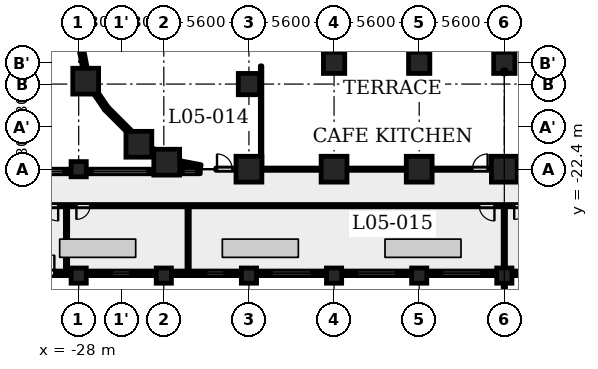
"""IFC4 building model, lengths in metres.
Left out: names, types, materials, properties, quantities, classifications, styles, units other than length and angle.
Written with IfcOpenShell. Run it as: python <this file> out.ifc"""

import sys

from ifc_helpers import new_model, si_unit, direction, frame, frame_2d, origin, origin_2d, place, context, subcontext, project, spatial, polyline, rectangle, circle, outline, extrude, element, fill, save


model = new_model("IFC4")
c1 = context("Model", 3, precision=1e-05, world=origin(), true_north=direction((0.0, 1.0)))
c2 = subcontext(c1, "Body", "Model", "MODEL_VIEW")
j1 = project(units=[si_unit("LENGTHUNIT", "METRE"), si_unit("PLANEANGLEUNIT", "RADIAN")], contexts=[c1])
p1 = place(None, origin())
s1 = spatial("IfcSite", under=j1, at=p1, CompositionType="ELEMENT")
p2 = place(p1, origin())
s2 = spatial("IfcBuilding", under=s1, at=p2, CompositionType="ELEMENT")
p3 = place(p2, frame((0.0, 0.0, 25.7)))
s3 = spatial("IfcBuildingStorey", under=s2, at=p3, CompositionType="ELEMENT", Elevation=25.7)
for number, where, z_axis, x_axis in (
    (1, (-22.209, -21.938, 0.0), (0.0, 0.0, 1.0), (1.0, 0.0, 0.0)),
    (2, (-16.8, -22.4, 0.0), (0.0, 0.0, 1.0), (1.0, 0.0, 0.0)),
    (3, (-11.2, -22.4, 0.0), (0.0, 0.0, 1.0), (1.0, 0.0, 0.0)),
    (4, (-5.6, -22.4, 0.0), (0.0, 0.0, 1.0), (1.0, 0.0, 0.0)),
    (5, (0.0, -22.4, 0.0), (0.0, 0.0, 1.0), (1.0, 0.0, 0.0)),
    (6, (-27.538, -16.609, 0.0), (0.0, 0.0, 1.0), (1.0, 0.0, 0.0)),
    (7, (-24.04, -20.76, 0.0), (0.0, 0.0, 1.0), (1.0, 0.0, 0.0)),
):
    element("IfcColumn", number, at=place(p3, frame(where, z_axis=z_axis, x_axis=x_axis)), inside=s3, PredefinedType="COLUMN", context=c2, shape_type="SweptSolid", body=[
        extrude(rectangle(XDim=1.7, YDim=1.7, at=origin_2d()), origin(), (0.0, 0.0, 1.0), 4.8),
    ])
for number, where, z_axis, x_axis in (
    (8, (-16.8, -16.8, 0.0), (0.0, 0.0, 1.0), (1.0, 0.0, 0.0)),
    (9, (-11.2, -15.4, 0.0), (0.0, 0.0, 1.0), (1.0, 0.0, 0.0)),
    (10, (-5.6, -15.4, 0.0), (0.0, 0.0, 1.0), (1.0, 0.0, 0.0)),
    (11, (0.0, -15.4, 0.0), (0.0, 0.0, 1.0), (1.0, 0.0, 0.0)),
):
    element("IfcColumn", number, at=place(p3, frame(where, z_axis=z_axis, x_axis=x_axis)), inside=s3, PredefinedType="COLUMN", context=c2, shape_type="SweptSolid", body=[
        extrude(rectangle(XDim=1.4, YDim=1.4, at=origin_2d()), origin(), (0.0, 0.0, 1.0), 4.8),
    ])
for number, where, z_axis, x_axis in (
    (12, (-28.0, -29.4, 0.0), (0.0, 0.0, 1.0), (1.0, 0.0, 0.0)),
    (13, (-22.4, -29.4, 0.0), (0.0, 0.0, 1.0), (1.0, 0.0, 0.0)),
    (14, (-16.8, -29.4, 0.0), (0.0, 0.0, 1.0), (1.0, 0.0, 0.0)),
    (15, (-11.2, -29.4, 0.0), (0.0, 0.0, 1.0), (1.0, 0.0, 0.0)),
    (16, (-5.6, -29.4, 0.0), (0.0, 0.0, 1.0), (1.0, 0.0, 0.0)),
    (17, (0.0, -29.4, 0.0), (0.0, 0.0, 1.0), (1.0, 0.0, 0.0)),
    (18, (-28.0, -22.4, 0.0), (0.0, 0.0, 1.0), (1.0, 0.0, 0.0)),
):
    element("IfcColumn", number, at=place(p3, frame(where, z_axis=z_axis, x_axis=x_axis)), inside=s3, PredefinedType="COLUMN", context=c2, shape_type="SweptSolid", body=[
        extrude(circle(Radius=0.5, at=origin_2d()), origin(), (0.0, 0.0, 1.0), 4.8),
    ])
for number, where, z_axis, x_axis in (
    (19, (-27.853, -14.372, 0.0), (0.0, 0.0, 1.0), (0.187, -0.982, 0.0)),
    (20, (-26.969, -17.25, 0.0), (0.0, 0.0, 1.0), (0.562, -0.827, 0.0)),
):
    element("IfcWall", number, at=place(p3, frame(where, z_axis=z_axis, x_axis=x_axis)), inside=s3, PredefinedType="SOLIDWALL", context=c2, shape_type="SweptSolid", body=[
        extrude(rectangle(XDim=1.406, YDim=0.3, at=frame_2d((0.703, 0.0))), origin(), (0.0, 0.0, 1.0), 3.55),
    ])
p4 = place(p3, frame((-26.197, -18.391, 0.0), z_axis=(0.0, 0.0, 1.0), x_axis=(0.707054835785, -0.707158722772, 0.0)))
e21 = element("IfcWall", 21, at=p4, inside=s3, PredefinedType="SOLIDWALL", context=c2, shape_type="SweptSolid", body=[
    extrude(rectangle(XDim=2.35, YDim=0.3, at=frame_2d((1.175, 0.0))), origin(), (0.0, 0.0, 1.0), 3.55),
])
p5 = place(p3, frame((-23.244, -21.101, 0.0), z_axis=(0.0, 0.0, 1.0), x_axis=(0.827135885329, -0.562001981492, 0.0)))
e22 = element("IfcWall", 22, at=p5, inside=s3, PredefinedType="SOLIDWALL", context=c2, shape_type="SweptSolid", body=[
    extrude(rectangle(XDim=0.477, YDim=0.3, at=frame_2d((0.239, 0.0))), origin(), (0.0, 0.0, 1.0), 4.45),
])
p6 = place(p3, frame((-21.353, -21.989, 0.0), z_axis=(0.0, 0.0, 1.0), x_axis=(0.98229142023, -0.187359455971, 0.0)))
e23 = element("IfcWall", 23, at=p6, inside=s3, PredefinedType="SOLIDWALL", context=c2, shape_type="SweptSolid", body=[
    extrude(rectangle(XDim=1.406, YDim=0.3, at=frame_2d((0.703, 0.0))), origin(), (0.0, 0.0, 1.0), 3.55),
])
p7 = place(p3, frame((-20.0, -22.55, 0.0), z_axis=(0.0, 0.0, 1.0), x_axis=(-1.0, 0.0, 0.0)))
e24 = element("IfcWall", 24, at=p7, inside=s3, PredefinedType="SOLIDWALL", context=c2, shape_type="SweptSolid", body=[
    extrude(rectangle(XDim=1.359, YDim=0.3, at=frame_2d((0.679, 0.0))), origin(), (0.0, 0.0, 1.0), 3.55),
])
p8 = place(p7, frame((0.279, 0.0, 0.6)))
e25 = element("IfcOpeningElement", 25, at=p8, cuts=e24, PredefinedType="OPENING", context=c2, shape_type="SweptSolid", body=[
    extrude(rectangle(XDim=0.8, YDim=1.55, at=frame_2d((0.4, 0.775))), frame((0.0, 0.16, 0.0), z_axis=(0.0, -1.0, 0.0), x_axis=(1.0, 0.0, 0.0)), (0.0, 0.0, 1.0), 0.32),
])
p9 = place(p3, frame((-23.059, -22.55, 0.0), z_axis=(0.0, 0.0, 1.0), x_axis=(-1.0, 0.0, 0.0)))
e26 = element("IfcWall", 26, at=p9, inside=s3, PredefinedType="SOLIDWALL", context=c2, shape_type="SweptSolid", body=[
    extrude(rectangle(XDim=4.441, YDim=0.3, at=frame_2d((2.221, 0.0))), origin(), (0.0, 0.0, 1.0), 4.45),
])
p10 = place(p9, frame((0.421, 0.0, 1.2)))
e27 = element("IfcOpeningElement", 27, at=p10, cuts=e26, PredefinedType="OPENING", context=c2, shape_type="SweptSolid", body=[
    extrude(rectangle(XDim=3.6, YDim=0.95, at=frame_2d((1.8, 0.475))), frame((0.0, 0.16, 0.0), z_axis=(0.0, -1.0, 0.0), x_axis=(1.0, 0.0, 0.0)), (0.0, 0.0, 1.0), 0.32),
])
p11 = place(p3, frame((-28.5, -22.55, 0.0), z_axis=(0.0, 0.0, 1.0), x_axis=(-1.0, 0.0, 0.0)))
e28 = element("IfcWall", 28, at=p11, inside=s3, PredefinedType="SOLIDWALL", context=c2, shape_type="SweptSolid", body=[
    extrude(rectangle(XDim=4.6, YDim=0.3, at=frame_2d((2.3, 0.0))), origin(), (0.0, 0.0, 1.0), 4.45),
])
p12 = place(p11, frame((0.5, 0.0, 1.2)))
e29 = element("IfcOpeningElement", 29, at=p12, cuts=e28, PredefinedType="OPENING", context=c2, shape_type="SweptSolid", body=[
    extrude(rectangle(XDim=3.6, YDim=0.95, at=frame_2d((1.8, 0.475))), frame((0.0, 0.16, 0.0), z_axis=(0.0, -1.0, 0.0), x_axis=(1.0, 0.0, 0.0)), (0.0, 0.0, 1.0), 0.32),
])
p13 = place(p3, frame((-33.1, -29.25, 0.0), z_axis=(0.0, 0.0, 1.0), x_axis=(1.0, 0.0, 0.0)))
e30 = element("IfcWall", 30, at=p13, inside=s3, PredefinedType="SOLIDWALL", context=c2, shape_type="SweptSolid", body=[
    extrude(rectangle(XDim=4.6, YDim=0.3, at=frame_2d((2.3, 0.0))), origin(), (0.0, 0.0, 1.0), 3.65),
])
p14 = place(p13, frame((1.1, 0.0, 0.0)))
e31 = element("IfcOpeningElement", 31, at=p14, cuts=e30, PredefinedType="OPENING", context=c2, shape_type="SweptSolid", body=[
    extrude(rectangle(XDim=2.4, YDim=2.3, at=frame_2d((1.2, 1.15))), frame((0.0, 0.16, 0.0), z_axis=(0.0, -1.0, 0.0), x_axis=(1.0, 0.0, 0.0)), (0.0, 0.0, 1.0), 0.32),
])
p15 = place(p3, frame((-27.5, -29.25, 0.0), z_axis=(0.0, 0.0, 1.0), x_axis=(1.0, 0.0, 0.0)))
e32 = element("IfcWall", 32, at=p15, inside=s3, PredefinedType="SOLIDWALL", context=c2, shape_type="SweptSolid", body=[
    extrude(rectangle(XDim=4.6, YDim=0.3, at=frame_2d((2.3, 0.0))), origin(), (0.0, 0.0, 1.0), 3.65),
])
p16 = place(p15, frame((1.7, 0.0, 0.6)))
e33 = element("IfcOpeningElement", 33, at=p16, cuts=e32, PredefinedType="OPENING", context=c2, shape_type="SweptSolid", body=[
    extrude(rectangle(XDim=1.2, YDim=1.55, at=frame_2d((0.6, 0.775))), frame((0.0, 0.16, 0.0), z_axis=(0.0, -1.0, 0.0), x_axis=(1.0, 0.0, 0.0)), (0.0, 0.0, 1.0), 0.32),
])
p17 = place(p3, frame((-21.9, -29.25, 0.0), z_axis=(0.0, 0.0, 1.0), x_axis=(1.0, 0.0, 0.0)))
e34 = element("IfcWall", 34, at=p17, inside=s3, PredefinedType="SOLIDWALL", context=c2, shape_type="SweptSolid", body=[
    extrude(rectangle(XDim=4.6, YDim=0.3, at=frame_2d((2.3, 0.0))), origin(), (0.0, 0.0, 1.0), 3.65),
])
p18 = place(p17, frame((2.288, 0.0, 0.6)))
e35 = element("IfcOpeningElement", 35, at=p18, cuts=e34, PredefinedType="OPENING", context=c2, shape_type="SweptSolid", body=[
    extrude(rectangle(XDim=1.2, YDim=1.55, at=frame_2d((0.6, 0.775))), frame((0.0, 0.16, 0.0), z_axis=(0.0, -1.0, 0.0), x_axis=(1.0, 0.0, 0.0)), (0.0, 0.0, 1.0), 0.32),
])
p19 = place(p3, frame((-16.3, -29.25, 0.0), z_axis=(0.0, 0.0, 1.0), x_axis=(1.0, 0.0, 0.0)))
e36 = element("IfcWall", 36, at=p19, inside=s3, PredefinedType="SOLIDWALL", context=c2, shape_type="SweptSolid", body=[
    extrude(rectangle(XDim=4.6, YDim=0.3, at=frame_2d((2.3, 0.0))), origin(), (0.0, 0.0, 1.0), 3.65),
])
p20 = place(p19, frame((1.0, 0.0, 0.9)))
e37 = element("IfcOpeningElement", 37, at=p20, cuts=e36, PredefinedType="OPENING", context=c2, shape_type="SweptSolid", body=[
    extrude(rectangle(XDim=2.6, YDim=1.25, at=frame_2d((1.3, 0.625))), frame((0.0, 0.16, 0.0), z_axis=(0.0, -1.0, 0.0), x_axis=(1.0, 0.0, 0.0)), (0.0, 0.0, 1.0), 0.32),
])
p21 = place(p3, frame((-10.7, -29.25, 0.0), z_axis=(0.0, 0.0, 1.0), x_axis=(1.0, 0.0, 0.0)))
e38 = element("IfcWall", 38, at=p21, inside=s3, PredefinedType="SOLIDWALL", context=c2, shape_type="SweptSolid", body=[
    extrude(rectangle(XDim=4.6, YDim=0.3, at=frame_2d((2.3, 0.0))), origin(), (0.0, 0.0, 1.0), 3.65),
])
p22 = place(p21, frame((1.0, 0.0, 0.9)))
e39 = element("IfcOpeningElement", 39, at=p22, cuts=e38, PredefinedType="OPENING", context=c2, shape_type="SweptSolid", body=[
    extrude(rectangle(XDim=2.6, YDim=1.25, at=frame_2d((1.3, 0.625))), frame((0.0, 0.16, 0.0), z_axis=(0.0, -1.0, 0.0), x_axis=(1.0, 0.0, 0.0)), (0.0, 0.0, 1.0), 0.32),
])
p23 = place(p3, frame((-5.1, -29.25, 0.0), z_axis=(0.0, 0.0, 1.0), x_axis=(1.0, 0.0, 0.0)))
e40 = element("IfcWall", 40, at=p23, inside=s3, PredefinedType="SOLIDWALL", context=c2, shape_type="SweptSolid", body=[
    extrude(rectangle(XDim=4.6, YDim=0.3, at=frame_2d((2.3, 0.0))), origin(), (0.0, 0.0, 1.0), 3.65),
])
p24 = place(p23, frame((1.0, 0.0, 0.9)))
e41 = element("IfcOpeningElement", 41, at=p24, cuts=e40, PredefinedType="OPENING", context=c2, shape_type="SweptSolid", body=[
    extrude(rectangle(XDim=2.6, YDim=1.25, at=frame_2d((1.3, 0.625))), frame((0.0, 0.16, 0.0), z_axis=(0.0, -1.0, 0.0), x_axis=(1.0, 0.0, 0.0)), (0.0, 0.0, 1.0), 0.32),
])
p25 = place(p3, frame((0.5, -29.25, 0.0), z_axis=(0.0, 0.0, 1.0), x_axis=(1.0, 0.0, 0.0)))
e42 = element("IfcWall", 42, at=p25, inside=s3, PredefinedType="SOLIDWALL", context=c2, shape_type="SweptSolid", body=[
    extrude(rectangle(XDim=4.6, YDim=0.3, at=frame_2d((2.3, 0.0))), origin(), (0.0, 0.0, 1.0), 3.65),
])
p26 = place(p25, frame((1.0, 0.0, 0.9)))
e43 = element("IfcOpeningElement", 43, at=p26, cuts=e42, PredefinedType="OPENING", context=c2, shape_type="SweptSolid", body=[
    extrude(rectangle(XDim=2.6, YDim=1.25, at=frame_2d((1.3, 0.625))), frame((0.0, 0.16, 0.0), z_axis=(0.0, -1.0, 0.0), x_axis=(1.0, 0.0, 0.0)), (0.0, 0.0, 1.0), 0.32),
])
p27 = place(p3, frame((-37.0, -24.8, 0.0), z_axis=(0.0, 0.0, 1.0), x_axis=(1.0, 0.0, 0.0)))
e44 = element("IfcWall", 44, at=p27, inside=s3, PredefinedType="PARTITIONING", context=c2, shape_type="SweptSolid", body=[
    extrude(rectangle(XDim=74.0, YDim=0.15, at=frame_2d((37.0, 0.0))), origin(), (0.0, 0.0, 1.0), 4.45),
])
p28 = place(p27, frame((6.65, 0.0, 0.0)))
e45 = element("IfcOpeningElement", 45, at=p28, cuts=e44, PredefinedType="OPENING", context=c2, shape_type="SweptSolid", body=[
    extrude(rectangle(XDim=1.0, YDim=2.1, at=frame_2d((0.5, 1.05))), frame((0.0, 0.085, 0.0), z_axis=(0.0, -1.0, 0.0), x_axis=(1.0, 0.0, 0.0)), (0.0, 0.0, 1.0), 0.17),
])
p29 = place(p27, frame((8.85, 0.0, 0.0)))
e46 = element("IfcOpeningElement", 46, at=p29, cuts=e44, PredefinedType="OPENING", context=c2, shape_type="SweptSolid", body=[
    extrude(rectangle(XDim=0.9, YDim=2.1, at=frame_2d((0.45, 1.05))), frame((0.0, 0.085, 0.0), z_axis=(0.0, -1.0, 0.0), x_axis=(1.0, 0.0, 0.0)), (0.0, 0.0, 1.0), 0.17),
])
p30 = place(p27, frame((35.35, 0.0, 0.0)))
e47 = element("IfcOpeningElement", 47, at=p30, cuts=e44, PredefinedType="OPENING", context=c2, shape_type="SweptSolid", body=[
    extrude(rectangle(XDim=1.0, YDim=2.1, at=frame_2d((0.5, 1.05))), frame((0.0, 0.085, 0.0), z_axis=(0.0, -1.0, 0.0), x_axis=(1.0, 0.0, 0.0)), (0.0, 0.0, 1.0), 0.17),
])
p31 = place(p27, frame((37.65, 0.0, 0.0)))
e48 = element("IfcOpeningElement", 48, at=p31, cuts=e44, PredefinedType="OPENING", context=c2, shape_type="SweptSolid", body=[
    extrude(rectangle(XDim=0.9, YDim=2.1, at=frame_2d((0.45, 1.05))), frame((0.0, 0.085, 0.0), z_axis=(0.0, -1.0, 0.0), x_axis=(1.0, 0.0, 0.0)), (0.0, 0.0, 1.0), 0.17),
])
p32 = place(p27, frame((53.4, 0.0, 0.0)))
e49 = element("IfcOpeningElement", 49, at=p32, cuts=e44, PredefinedType="OPENING", context=c2, shape_type="SweptSolid", body=[
    extrude(rectangle(XDim=1.0, YDim=2.1, at=frame_2d((0.5, 1.05))), frame((0.0, 0.085, 0.0), z_axis=(0.0, -1.0, 0.0), x_axis=(1.0, 0.0, 0.0)), (0.0, 0.0, 1.0), 0.17),
])
p33 = place(p27, frame((55.65, 0.0, 0.0)))
e50 = element("IfcOpeningElement", 50, at=p33, cuts=e44, PredefinedType="OPENING", context=c2, shape_type="SweptSolid", body=[
    extrude(rectangle(XDim=1.0, YDim=2.1, at=frame_2d((0.5, 1.05))), frame((0.0, 0.085, 0.0), z_axis=(0.0, -1.0, 0.0), x_axis=(1.0, 0.0, 0.0)), (0.0, 0.0, 1.0), 0.17),
])
p34 = place(p3, frame((-18.98, -22.4, 0.0), z_axis=(0.0, 0.0, 1.0), x_axis=(1.0, 0.0, 0.0)))
e51 = element("IfcWall", 51, at=p34, inside=s3, PredefinedType="PARTITIONING", context=c2, shape_type="SweptSolid", body=[
    extrude(rectangle(XDim=38.211, YDim=0.15, at=frame_2d((19.105, 0.0))), origin(), (0.0, 0.0, 1.0), 3.55),
])
p35 = place(p34, frame((21.18, 0.0, 0.0)))
e52 = element("IfcOpeningElement", 52, at=p35, cuts=e51, PredefinedType="OPENING", context=c2, shape_type="SweptSolid", body=[
    extrude(rectangle(XDim=1.2, YDim=2.1, at=frame_2d((0.6, 1.05))), frame((0.0, 0.085, 0.0), z_axis=(0.0, -1.0, 0.0), x_axis=(1.0, 0.0, 0.0)), (0.0, 0.0, 1.0), 0.17),
])
p36 = place(p34, frame((0.08, 0.0, 0.0)))
e53 = element("IfcOpeningElement", 53, at=p36, cuts=e51, PredefinedType="OPENING", context=c2, shape_type="SweptSolid", body=[
    extrude(rectangle(XDim=1.0, YDim=2.1, at=frame_2d((0.5, 1.05))), frame((0.0, 0.085, 0.0), z_axis=(0.0, -1.0, 0.0), x_axis=(1.0, 0.0, 0.0)), (0.0, 0.0, 1.0), 0.17),
])
p37 = place(p34, frame((16.88, 0.0, 0.0)))
e54 = element("IfcOpeningElement", 54, at=p37, cuts=e51, PredefinedType="OPENING", context=c2, shape_type="SweptSolid", body=[
    extrude(rectangle(XDim=1.0, YDim=2.1, at=frame_2d((0.5, 1.05))), frame((0.0, 0.085, 0.0), z_axis=(0.0, -1.0, 0.0), x_axis=(1.0, 0.0, 0.0)), (0.0, 0.0, 1.0), 0.17),
])
p38 = place(p34, frame((25.68, 0.0, 0.0)))
e55 = element("IfcOpeningElement", 55, at=p38, cuts=e51, PredefinedType="OPENING", context=c2, shape_type="SweptSolid", body=[
    extrude(rectangle(XDim=0.9, YDim=2.1, at=frame_2d((0.45, 1.05))), frame((0.0, 0.085, 0.0), z_axis=(0.0, -1.0, 0.0), x_axis=(1.0, 0.0, 0.0)), (0.0, 0.0, 1.0), 0.17),
])
p39 = place(p34, frame((31.18, 0.0, 0.0)))
e56 = element("IfcOpeningElement", 56, at=p39, cuts=e51, PredefinedType="OPENING", context=c2, shape_type="SweptSolid", body=[
    extrude(rectangle(XDim=0.9, YDim=2.1, at=frame_2d((0.45, 1.05))), frame((0.0, 0.085, 0.0), z_axis=(0.0, -1.0, 0.0), x_axis=(1.0, 0.0, 0.0)), (0.0, 0.0, 1.0), 0.17),
])
p40 = place(p34, frame((33.13, 0.0, 0.0)))
e57 = element("IfcOpeningElement", 57, at=p40, cuts=e51, PredefinedType="OPENING", context=c2, shape_type="SweptSolid", body=[
    extrude(rectangle(XDim=0.9, YDim=2.1, at=frame_2d((0.45, 1.05))), frame((0.0, 0.085, 0.0), z_axis=(0.0, -1.0, 0.0), x_axis=(1.0, 0.0, 0.0)), (0.0, 0.0, 1.0), 0.17),
])
p41 = place(p34, frame((37.231, 0.0, 0.0)))
e58 = element("IfcOpeningElement", 58, at=p41, cuts=e51, PredefinedType="OPENING", context=c2, shape_type="SweptSolid", body=[
    extrude(rectangle(XDim=0.9, YDim=2.1, at=frame_2d((0.45, 1.05))), frame((0.0, 0.085, 0.0), z_axis=(0.0, -1.0, 0.0), x_axis=(1.0, 0.0, 0.0)), (0.0, 0.0, 1.0), 0.17),
])
for number, where, z_axis, x_axis in (
    (59, (-28.8, -29.08, 0.0), (0.0, 0.0, 1.0), (0.0, 1.0, 0.0)),
    (60, (-20.8, -29.08, 0.0), (0.0, 0.0, 1.0), (0.0, 1.0, 0.0)),
):
    element("IfcWall", number, at=place(p3, frame(where, z_axis=z_axis, x_axis=x_axis)), inside=s3, PredefinedType="PARTITIONING", context=c2, shape_type="SweptSolid", body=[
        extrude(rectangle(XDim=4.205, YDim=0.15, at=frame_2d((2.103, 0.0))), origin(), (0.0, 0.0, 1.0), 4.45),
    ])
p42 = place(p3, frame((-16.0, -22.325, 0.0), z_axis=(0.0, 0.0, 1.0), x_axis=(0.0, 1.0, 0.0)))
e61 = element("IfcWall", 61, at=p42, inside=s3, PredefinedType="PARTITIONING", context=c2, shape_type="SweptSolid", body=[
    extrude(rectangle(XDim=6.725, YDim=0.1, at=frame_2d((3.362, 0.0))), origin(), (0.0, 0.0, 1.0), 4.45),
])
p43 = place(p3, frame((0.0, -30.23, 0.0), z_axis=(0.0, 0.0, 1.0), x_axis=(0.0, 1.0, 0.0)))
e62 = element("IfcWall", 62, at=p43, inside=s3, PredefinedType="PARTITIONING", context=c2, shape_type="SweptSolid", body=[
    extrude(rectangle(XDim=5.355, YDim=0.15, at=frame_2d((2.677, 0.0))), origin(), (0.0, 0.0, 1.0), 4.45),
])
p44 = place(p3, origin())
e63 = element("IfcWall", 63, at=p44, inside=s3, PredefinedType="SOLIDWALL", context=c2, shape_type="SweptSolid", body=[
    extrude(outline(polyline([(-20.0, -22.7), (-19.0, -22.7), (-19.0, -22.285), (-19.944, -22.105), (-20.0, -22.4), (-20.0, -22.7)])), origin(), (0.0, 0.0, 1.0), 3.55),
])
p45 = place(p14, origin())
e64 = element("IfcDoor", 64, at=p45, inside=s3, OperationType="SINGLE_SWING_LEFT", PredefinedType="DOOR", context=c2, shape_type="SweptSolid", body=[
    extrude(rectangle(XDim=2.4, YDim=2.3, at=frame_2d((1.2, 1.15))), frame((0.0, 0.025, 0.0), z_axis=(0.0, -1.0, 0.0), x_axis=(1.0, 0.0, 0.0)), (0.0, 0.0, 1.0), 0.05),
])
fill(e31, e64)
p46 = place(p28, origin())
e65 = element("IfcDoor", 65, at=p46, inside=s3, OperationType="SINGLE_SWING_RIGHT", PredefinedType="DOOR", context=c2, shape_type="SweptSolid", body=[
    extrude(rectangle(XDim=1.0, YDim=2.1, at=frame_2d((0.5, 1.05))), frame((0.0, 0.025, 0.0), z_axis=(0.0, -1.0, 0.0), x_axis=(1.0, 0.0, 0.0)), (0.0, 0.0, 1.0), 0.05),
])
fill(e45, e65)
p47 = place(p29, origin())
e66 = element("IfcDoor", 66, at=p47, inside=s3, OperationType="SINGLE_SWING_LEFT", PredefinedType="DOOR", context=c2, shape_type="SweptSolid", body=[
    extrude(rectangle(XDim=0.9, YDim=2.1, at=frame_2d((0.45, 1.05))), frame((0.0, 0.025, 0.0), z_axis=(0.0, -1.0, 0.0), x_axis=(1.0, 0.0, 0.0)), (0.0, 0.0, 1.0), 0.05),
])
fill(e46, e66)
p48 = place(p30, origin())
e67 = element("IfcDoor", 67, at=p48, inside=s3, OperationType="SINGLE_SWING_RIGHT", PredefinedType="DOOR", context=c2, shape_type="SweptSolid", body=[
    extrude(rectangle(XDim=1.0, YDim=2.1, at=frame_2d((0.5, 1.05))), frame((0.0, 0.025, 0.0), z_axis=(0.0, -1.0, 0.0), x_axis=(1.0, 0.0, 0.0)), (0.0, 0.0, 1.0), 0.05),
])
fill(e47, e67)
p49 = place(p31, origin())
e68 = element("IfcDoor", 68, at=p49, inside=s3, OperationType="SINGLE_SWING_LEFT", PredefinedType="DOOR", context=c2, shape_type="SweptSolid", body=[
    extrude(rectangle(XDim=0.9, YDim=2.1, at=frame_2d((0.45, 1.05))), frame((0.0, 0.025, 0.0), z_axis=(0.0, -1.0, 0.0), x_axis=(1.0, 0.0, 0.0)), (0.0, 0.0, 1.0), 0.05),
])
fill(e48, e68)
p50 = place(p36, origin())
e69 = element("IfcDoor", 69, at=p50, inside=s3, OperationType="SINGLE_SWING_RIGHT", PredefinedType="DOOR", context=c2, shape_type="SweptSolid", body=[
    extrude(rectangle(XDim=1.0, YDim=2.1, at=frame_2d((0.5, 1.05))), frame((0.0, 0.025, 0.0), z_axis=(0.0, -1.0, 0.0), x_axis=(1.0, 0.0, 0.0)), (0.0, 0.0, 1.0), 0.05),
])
fill(e53, e69)
p51 = place(p37, origin())
e70 = element("IfcDoor", 70, at=p51, inside=s3, OperationType="SINGLE_SWING_LEFT", PredefinedType="DOOR", context=c2, shape_type="SweptSolid", body=[
    extrude(rectangle(XDim=1.0, YDim=2.1, at=frame_2d((0.5, 1.05))), frame((0.0, 0.025, 0.0), z_axis=(0.0, -1.0, 0.0), x_axis=(1.0, 0.0, 0.0)), (0.0, 0.0, 1.0), 0.05),
])
fill(e54, e70)
p52 = place(p8, origin())
e71 = element("IfcWindow", 71, at=p52, inside=s3, PartitioningType="SINGLE_PANEL", PredefinedType="WINDOW", context=c2, shape_type="SweptSolid", body=[
    extrude(rectangle(XDim=0.8, YDim=1.55, at=frame_2d((0.4, 0.775))), frame((0.0, 0.03, 0.0), z_axis=(0.0, -1.0, 0.0), x_axis=(1.0, 0.0, 0.0)), (0.0, 0.0, 1.0), 0.06),
])
fill(e25, e71)
p53 = place(p10, origin())
e72 = element("IfcWindow", 72, at=p53, inside=s3, PartitioningType="SINGLE_PANEL", PredefinedType="WINDOW", context=c2, shape_type="SweptSolid", body=[
    extrude(rectangle(XDim=3.6, YDim=0.95, at=frame_2d((1.8, 0.475))), frame((0.0, 0.03, 0.0), z_axis=(0.0, -1.0, 0.0), x_axis=(1.0, 0.0, 0.0)), (0.0, 0.0, 1.0), 0.06),
])
fill(e27, e72)
p54 = place(p12, origin())
e73 = element("IfcWindow", 73, at=p54, inside=s3, PartitioningType="SINGLE_PANEL", PredefinedType="WINDOW", context=c2, shape_type="SweptSolid", body=[
    extrude(rectangle(XDim=3.6, YDim=0.95, at=frame_2d((1.8, 0.475))), frame((0.0, 0.03, 0.0), z_axis=(0.0, -1.0, 0.0), x_axis=(1.0, 0.0, 0.0)), (0.0, 0.0, 1.0), 0.06),
])
fill(e29, e73)
p55 = place(p16, origin())
e74 = element("IfcWindow", 74, at=p55, inside=s3, PartitioningType="SINGLE_PANEL", PredefinedType="WINDOW", context=c2, shape_type="SweptSolid", body=[
    extrude(rectangle(XDim=1.2, YDim=1.55, at=frame_2d((0.6, 0.775))), frame((0.0, 0.03, 0.0), z_axis=(0.0, -1.0, 0.0), x_axis=(1.0, 0.0, 0.0)), (0.0, 0.0, 1.0), 0.06),
])
fill(e33, e74)
p56 = place(p18, origin())
e75 = element("IfcWindow", 75, at=p56, inside=s3, PartitioningType="SINGLE_PANEL", PredefinedType="WINDOW", context=c2, shape_type="SweptSolid", body=[
    extrude(rectangle(XDim=1.2, YDim=1.55, at=frame_2d((0.6, 0.775))), frame((0.0, 0.03, 0.0), z_axis=(0.0, -1.0, 0.0), x_axis=(1.0, 0.0, 0.0)), (0.0, 0.0, 1.0), 0.06),
])
fill(e35, e75)
p57 = place(p20, origin())
e76 = element("IfcWindow", 76, at=p57, inside=s3, PartitioningType="SINGLE_PANEL", PredefinedType="WINDOW", context=c2, shape_type="SweptSolid", body=[
    extrude(rectangle(XDim=2.6, YDim=1.25, at=frame_2d((1.3, 0.625))), frame((0.0, 0.03, 0.0), z_axis=(0.0, -1.0, 0.0), x_axis=(1.0, 0.0, 0.0)), (0.0, 0.0, 1.0), 0.06),
])
fill(e37, e76)
p58 = place(p22, origin())
e77 = element("IfcWindow", 77, at=p58, inside=s3, PartitioningType="SINGLE_PANEL", PredefinedType="WINDOW", context=c2, shape_type="SweptSolid", body=[
    extrude(rectangle(XDim=2.6, YDim=1.25, at=frame_2d((1.3, 0.625))), frame((0.0, 0.03, 0.0), z_axis=(0.0, -1.0, 0.0), x_axis=(1.0, 0.0, 0.0)), (0.0, 0.0, 1.0), 0.06),
])
fill(e39, e77)
p59 = place(p24, origin())
e78 = element("IfcWindow", 78, at=p59, inside=s3, PartitioningType="SINGLE_PANEL", PredefinedType="WINDOW", context=c2, shape_type="SweptSolid", body=[
    extrude(rectangle(XDim=2.6, YDim=1.25, at=frame_2d((1.3, 0.625))), frame((0.0, 0.03, 0.0), z_axis=(0.0, -1.0, 0.0), x_axis=(1.0, 0.0, 0.0)), (0.0, 0.0, 1.0), 0.06),
])
fill(e41, e78)
save(model, sys.argv[1])
